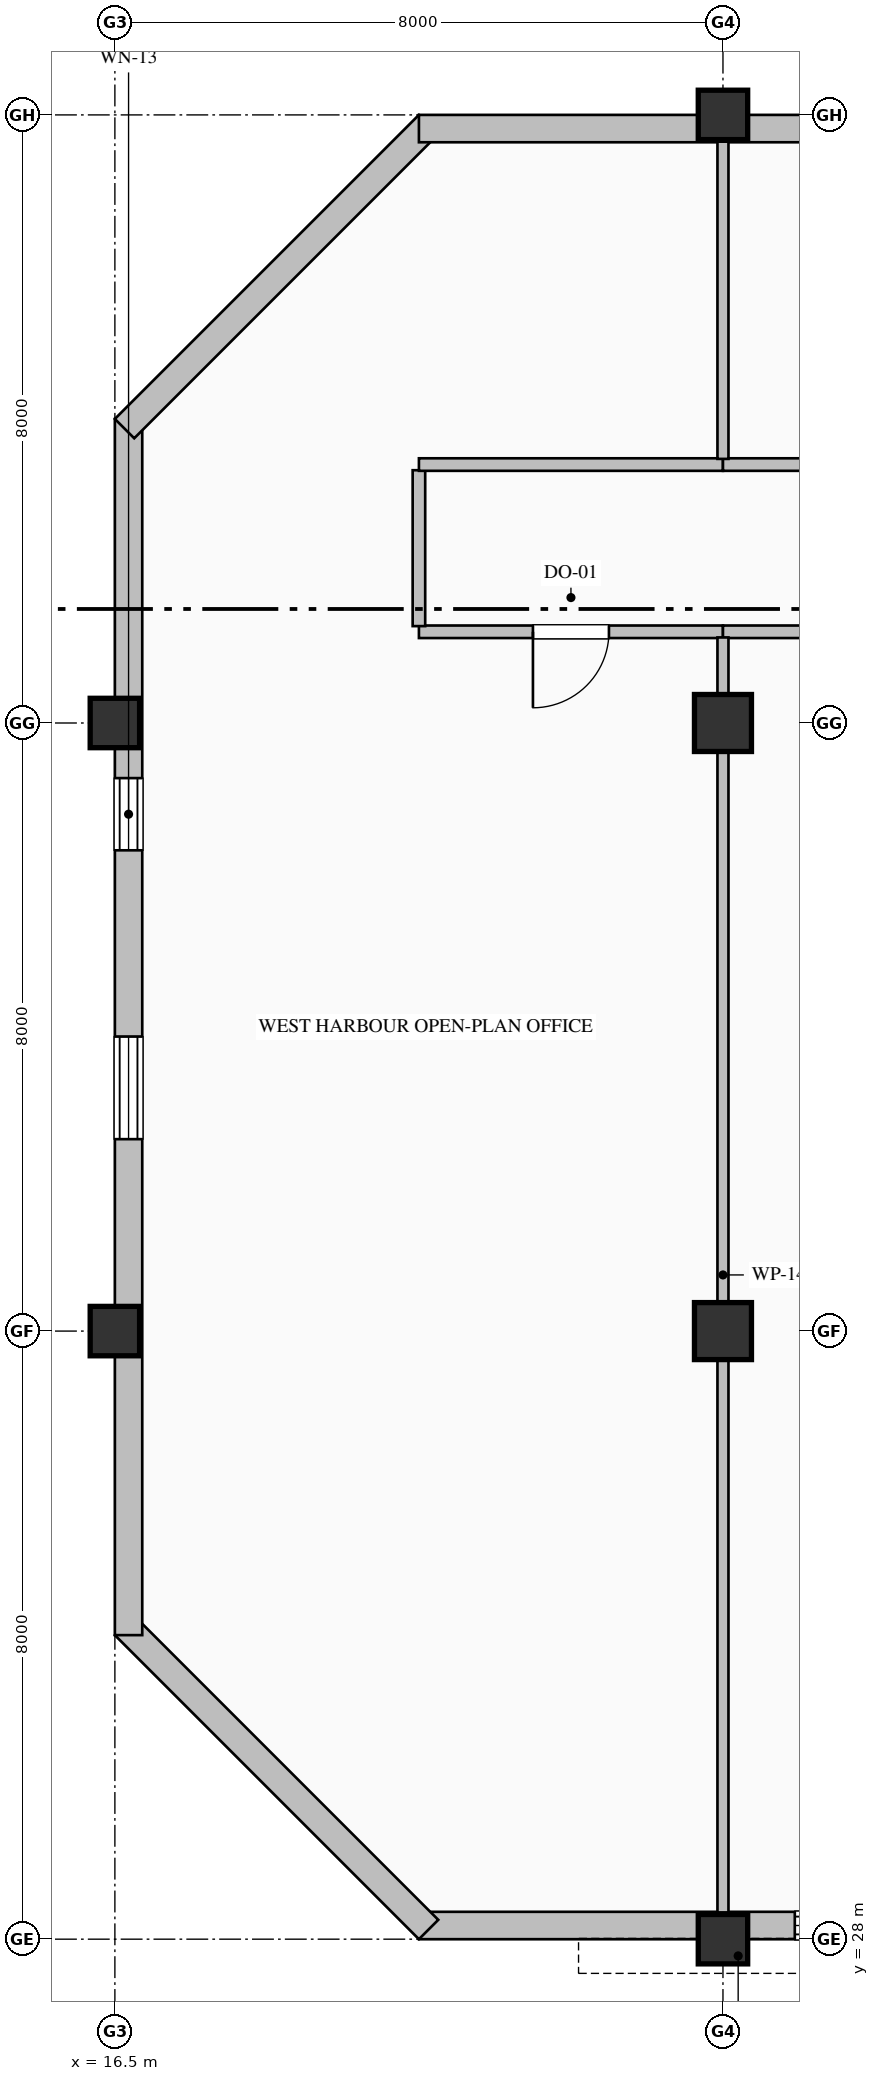
"""IFC4 building model, lengths in metres.
Left out: names, types, materials, properties, quantities, classifications, styles, units other than length and angle.
Written with IfcOpenShell. Run it as: python <this file> out.ifc"""

import sys

from ifc_helpers import new_model, si_unit, direction, frame, frame_2d, origin, origin_2d, place, context, subcontext, project, spatial, rectangle, hollow_rectangle, extrude, element, fill, save


model = new_model("IFC4")
c1 = context("Model", 3, precision=1e-05, world=origin(), true_north=direction((0.0, 1.0)))
c2 = subcontext(c1, "Body", "Model", "MODEL_VIEW")
j1 = project(units=[si_unit("LENGTHUNIT", "METRE"), si_unit("PLANEANGLEUNIT", "RADIAN")], contexts=[c1])
p1 = place(None, origin())
s1 = spatial("IfcSite", under=j1, at=p1, CompositionType="ELEMENT")
p2 = place(p1, origin())
s2 = spatial("IfcBuilding", under=s1, at=p2, CompositionType="ELEMENT")
p3 = place(p2, frame((0.0, 0.0, 315.2)))
s3 = spatial("IfcBuildingStorey", under=s2, at=p3, CompositionType="ELEMENT", Elevation=315.2)
for number, where, z_axis, x_axis in (
    (1, (16.5, 36.0, 0.0), (0.0, 0.0, 1.0), (1.0, 0.0, 0.0)),
    (2, (16.5, 44.0, 0.0), (0.0, 0.0, 1.0), (1.0, 0.0, 0.0)),
    (3, (24.5, 28.0, 0.0), (0.0, 0.0, 1.0), (1.0, 0.0, 0.0)),
):
    element("IfcColumn", number, at=place(p3, frame(where, z_axis=z_axis, x_axis=x_axis)), inside=s3, PredefinedType="COLUMN", context=c2, shape_type="SweptSolid", body=[
        extrude(hollow_rectangle(XDim=0.65, YDim=0.65, WallThickness=0.028, at=origin_2d()), origin(), (0.0, 0.0, 1.0), 4.0),
    ])
for number, where, z_axis, x_axis in (
    (4, (24.5, 36.0, 0.0), (0.0, 0.0, 1.0), (1.0, 0.0, 0.0)),
    (5, (24.5, 44.0, 0.0), (0.0, 0.0, 1.0), (1.0, 0.0, 0.0)),
):
    element("IfcColumn", number, at=place(p3, frame(where, z_axis=z_axis, x_axis=x_axis)), inside=s3, PredefinedType="COLUMN", context=c2, shape_type="SweptSolid", body=[
        extrude(rectangle(XDim=0.75, YDim=0.75, at=origin_2d()), origin(), (0.0, 0.0, 1.0), 4.0),
    ])
p4 = place(p3, frame((24.5, 52.0, 0.0), z_axis=(0.0, 0.0, 1.0), x_axis=(1.0, 0.0, 0.0)))
e6 = element("IfcColumn", 6, at=p4, inside=s3, PredefinedType="COLUMN", context=c2, shape_type="SweptSolid", body=[
    extrude(hollow_rectangle(XDim=0.65, YDim=0.65, WallThickness=0.028, at=origin_2d()), origin(), (0.0, 0.0, 1.0), 4.0),
])
p5 = place(p3, frame((40.52, 28.18, 0.0), z_axis=(0.0, 0.0, 1.0), x_axis=(-1.0, 0.0, 0.0)))
e7 = element("IfcWall", 7, at=p5, inside=s3, PredefinedType="SOLIDWALL", context=c2, shape_type="SweptSolid", body=[
    extrude(rectangle(XDim=20.02, YDim=0.36, at=frame_2d((10.01, 0.0))), origin(), (0.0, 0.0, 1.0), 3.185),
])
p6 = place(p5, frame((2.925, 0.0, 0.9)))
e8 = element("IfcOpeningElement", 8, at=p6, cuts=e7, PredefinedType="OPENING", context=c2, shape_type="SweptSolid", body=[
    extrude(rectangle(XDim=1.35, YDim=1.85, at=frame_2d((0.675, 0.925))), frame((0.0, 0.19, 0.0), z_axis=(0.0, -1.0, 0.0), x_axis=(1.0, 0.0, 0.0)), (0.0, 0.0, 1.0), 0.38),
])
p7 = place(p5, frame((10.275, 0.0, 0.8)))
e9 = element("IfcOpeningElement", 9, at=p7, cuts=e7, PredefinedType="OPENING", context=c2, shape_type="SweptSolid", body=[
    extrude(rectangle(XDim=1.05, YDim=2.15, at=frame_2d((0.525, 1.075))), frame((0.0, 0.19, 0.0), z_axis=(0.0, -1.0, 0.0), x_axis=(1.0, 0.0, 0.0)), (0.0, 0.0, 1.0), 0.38),
])
p8 = place(p5, frame((13.725, 0.0, 0.9)))
e10 = element("IfcOpeningElement", 10, at=p8, cuts=e7, PredefinedType="OPENING", context=c2, shape_type="SweptSolid", body=[
    extrude(rectangle(XDim=1.35, YDim=1.85, at=frame_2d((0.675, 0.925))), frame((0.0, 0.19, 0.0), z_axis=(0.0, -1.0, 0.0), x_axis=(1.0, 0.0, 0.0)), (0.0, 0.0, 1.0), 0.38),
])
p9 = place(p3, frame((20.627, 28.127, 0.0), z_axis=(0.0, 0.0, 1.0), x_axis=(-0.707106781187, 0.707106781187, 0.0)))
e11 = element("IfcWall", 11, at=p9, inside=s3, PredefinedType="SOLIDWALL", context=c2, shape_type="SweptSolid", body=[
    extrude(rectangle(XDim=5.657, YDim=0.36, at=frame_2d((2.828, 0.0))), origin(), (0.0, 0.0, 1.0), 3.785),
])
p10 = place(p3, frame((16.68, 32.0, 0.0), z_axis=(0.0, 0.0, 1.0), x_axis=(0.0, 1.0, 0.0)))
e12 = element("IfcWall", 12, at=p10, inside=s3, PredefinedType="SOLIDWALL", context=c2, shape_type="SweptSolid", body=[
    extrude(rectangle(XDim=16.0, YDim=0.36, at=frame_2d((8.0, 0.0))), origin(), (0.0, 0.0, 1.0), 3.335),
])
p11 = place(p10, frame((6.525, 0.0, 0.9)))
e13 = element("IfcOpeningElement", 13, at=p11, cuts=e12, PredefinedType="OPENING", context=c2, shape_type="SweptSolid", body=[
    extrude(rectangle(XDim=1.35, YDim=1.85, at=frame_2d((0.675, 0.925))), frame((0.0, 0.19, 0.0), z_axis=(0.0, -1.0, 0.0), x_axis=(1.0, 0.0, 0.0)), (0.0, 0.0, 1.0), 0.38),
])
p12 = place(p10, frame((10.325, 0.0, 0.9)))
e14 = element("IfcOpeningElement", 14, at=p12, cuts=e12, PredefinedType="OPENING", context=c2, shape_type="SweptSolid", body=[
    extrude(rectangle(XDim=0.95, YDim=1.85, at=frame_2d((0.475, 0.925))), frame((0.0, 0.19, 0.0), z_axis=(0.0, -1.0, 0.0), x_axis=(1.0, 0.0, 0.0)), (0.0, 0.0, 1.0), 0.38),
])
p13 = place(p3, frame((16.627, 47.873, 0.0), z_axis=(0.0, 0.0, 1.0), x_axis=(0.707106781187, 0.707106781187, 0.0)))
e15 = element("IfcWall", 15, at=p13, inside=s3, PredefinedType="SOLIDWALL", context=c2, shape_type="SweptSolid", body=[
    extrude(rectangle(XDim=5.657, YDim=0.36, at=frame_2d((2.828, 0.0))), origin(), (0.0, 0.0, 1.0), 3.785),
])
p14 = place(p3, frame((20.5, 51.82, 0.0), z_axis=(0.0, 0.0, 1.0), x_axis=(1.0, 0.0, 0.0)))
e16 = element("IfcWall", 16, at=p14, inside=s3, PredefinedType="SOLIDWALL", context=c2, shape_type="SweptSolid", body=[
    extrude(rectangle(XDim=20.02, YDim=0.36, at=frame_2d((10.01, 0.0))), origin(), (0.0, 0.0, 1.0), 3.335),
])
p15 = place(p14, frame((6.675, 0.0, 0.8)))
e17 = element("IfcOpeningElement", 17, at=p15, cuts=e16, PredefinedType="OPENING", context=c2, shape_type="SweptSolid", body=[
    extrude(rectangle(XDim=1.05, YDim=2.15, at=frame_2d((0.525, 1.075))), frame((0.0, 0.19, 0.0), z_axis=(0.0, -1.0, 0.0), x_axis=(1.0, 0.0, 0.0)), (0.0, 0.0, 1.0), 0.38),
])
p16 = place(p3, frame((24.5, 45.2, 0.0), z_axis=(0.0, 0.0, 1.0), x_axis=(-1.0, 0.0, 0.0)))
e18 = element("IfcWall", 18, at=p16, inside=s3, PredefinedType="PARTITIONING", context=c2, shape_type="SweptSolid", body=[
    extrude(rectangle(XDim=4.0, YDim=0.165, at=frame_2d((2.0, 0.0))), origin(), (0.0, 0.0, 1.0), 3.785),
])
p17 = place(p16, frame((1.5, 0.0, 0.0)))
e19 = element("IfcOpeningElement", 19, at=p17, cuts=e18, PredefinedType="OPENING", context=c2, shape_type="SweptSolid", body=[
    extrude(rectangle(XDim=1.0, YDim=2.15, at=frame_2d((0.5, 1.075))), frame((0.0, 0.093, 0.0), z_axis=(0.0, -1.0, 0.0), x_axis=(1.0, 0.0, 0.0)), (0.0, 0.0, 1.0), 0.185),
])
p18 = place(p3, frame((20.5, 45.274, 0.0), z_axis=(0.0, 0.0, 1.0), x_axis=(0.0, 1.0, 0.0)))
e20 = element("IfcWall", 20, at=p18, inside=s3, PredefinedType="PARTITIONING", context=c2, shape_type="SweptSolid", body=[
    extrude(rectangle(XDim=2.051, YDim=0.165, at=frame_2d((1.025, 0.0))), origin(), (0.0, 0.0, 1.0), 3.785),
])
p19 = place(p3, frame((20.5, 47.4, 0.0), z_axis=(0.0, 0.0, 1.0), x_axis=(1.0, 0.0, 0.0)))
e21 = element("IfcWall", 21, at=p19, inside=s3, PredefinedType="PARTITIONING", context=c2, shape_type="SweptSolid", body=[
    extrude(rectangle(XDim=4.0, YDim=0.165, at=frame_2d((2.0, 0.0))), origin(), (0.0, 0.0, 1.0), 3.785),
])
p20 = place(p3, frame((24.5, 47.4, 0.0), z_axis=(0.0, 0.0, 1.0), x_axis=(1.0, 0.0, 0.0)))
e22 = element("IfcWall", 22, at=p20, inside=s3, PredefinedType="PARTITIONING", context=c2, shape_type="SweptSolid", body=[
    extrude(rectangle(XDim=10.9, YDim=0.165, at=frame_2d((5.45, 0.0))), origin(), (0.0, 0.0, 1.0), 3.785),
])
p21 = place(p20, frame((5.0, 0.0, 0.0)))
e23 = element("IfcOpeningElement", 23, at=p21, cuts=e22, PredefinedType="OPENING", context=c2, shape_type="SweptSolid", body=[
    extrude(rectangle(XDim=0.9, YDim=2.15, at=frame_2d((0.45, 1.075))), frame((0.0, 0.093, 0.0), z_axis=(0.0, -1.0, 0.0), x_axis=(1.0, 0.0, 0.0)), (0.0, 0.0, 1.0), 0.185),
])
p22 = place(p3, frame((31.0, 45.2, 0.0), z_axis=(0.0, 0.0, 1.0), x_axis=(-1.0, 0.0, 0.0)))
e24 = element("IfcWall", 24, at=p22, inside=s3, PredefinedType="PARTITIONING", context=c2, shape_type="SweptSolid", body=[
    extrude(rectangle(XDim=6.5, YDim=0.165, at=frame_2d((3.25, 0.0))), origin(), (0.0, 0.0, 1.0), 3.785),
])
p23 = place(p22, frame((2.75, 0.0, 0.0)))
e25 = element("IfcOpeningElement", 25, at=p23, cuts=e24, PredefinedType="OPENING", context=c2, shape_type="SweptSolid", body=[
    extrude(rectangle(XDim=1.0, YDim=2.15, at=frame_2d((0.5, 1.075))), frame((0.0, 0.093, 0.0), z_axis=(0.0, -1.0, 0.0), x_axis=(1.0, 0.0, 0.0)), (0.0, 0.0, 1.0), 0.185),
])
p24 = place(p3, frame((24.5, 51.648, 0.0), z_axis=(0.0, 0.0, 1.0), x_axis=(0.0, -1.0, 0.0)))
e26 = element("IfcWall", 26, at=p24, inside=s3, PredefinedType="PARTITIONING", context=c2, shape_type="SweptSolid", body=[
    extrude(rectangle(XDim=4.173, YDim=0.145, at=frame_2d((2.087, 0.0))), origin(), (0.0, 0.0, 1.0), 3.177),
])
p25 = place(p3, frame((24.5, 45.125, 0.0), z_axis=(0.0, 0.0, 1.0), x_axis=(0.0, -1.0, 0.0)))
e27 = element("IfcWall", 27, at=p25, inside=s3, PredefinedType="PARTITIONING", context=c2, shape_type="SweptSolid", body=[
    extrude(rectangle(XDim=16.773, YDim=0.145, at=frame_2d((8.387, 0.0))), origin(), (0.0, 0.0, 1.0), 3.177),
])
p26 = place(p8, origin())
e28 = element("IfcWindow", 28, at=p26, inside=s3, PartitioningType="DOUBLE_PANEL_VERTICAL", PredefinedType="WINDOW", context=c2, shape_type="SweptSolid", body=[
    extrude(rectangle(XDim=1.35, YDim=1.85, at=frame_2d((0.675, 0.925))), frame((0.0, 0.15, 0.0), z_axis=(0.0, -1.0, 0.0), x_axis=(1.0, 0.0, 0.0)), (0.0, 0.0, 1.0), 0.06),
])
fill(e10, e28)
p27 = place(p11, origin())
e29 = element("IfcWindow", 29, at=p27, inside=s3, PartitioningType="DOUBLE_PANEL_VERTICAL", PredefinedType="WINDOW", context=c2, shape_type="SweptSolid", body=[
    extrude(rectangle(XDim=1.35, YDim=1.85, at=frame_2d((0.675, 0.925))), frame((0.0, 0.15, 0.0), z_axis=(0.0, -1.0, 0.0), x_axis=(1.0, 0.0, 0.0)), (0.0, 0.0, 1.0), 0.06),
])
fill(e13, e29)
p28 = place(p12, origin())
e30 = element("IfcWindow", 30, at=p28, inside=s3, PartitioningType="SINGLE_PANEL", PredefinedType="WINDOW", context=c2, shape_type="SweptSolid", body=[
    extrude(rectangle(XDim=0.95, YDim=1.85, at=frame_2d((0.475, 0.925))), frame((0.0, 0.15, 0.0), z_axis=(0.0, -1.0, 0.0), x_axis=(1.0, 0.0, 0.0)), (0.0, 0.0, 1.0), 0.06),
])
fill(e14, e30)
p29 = place(p17, origin())
e31 = element("IfcDoor", 31, at=p29, inside=s3, OperationType="SINGLE_SWING_RIGHT", PredefinedType="DOOR", context=c2, shape_type="SweptSolid", body=[
    extrude(rectangle(XDim=1.0, YDim=2.15, at=frame_2d((0.5, 1.075))), frame((0.0, 0.025, 0.0), z_axis=(0.0, -1.0, 0.0), x_axis=(1.0, 0.0, 0.0)), (0.0, 0.0, 1.0), 0.05),
])
fill(e19, e31)
save(model, sys.argv[1])
